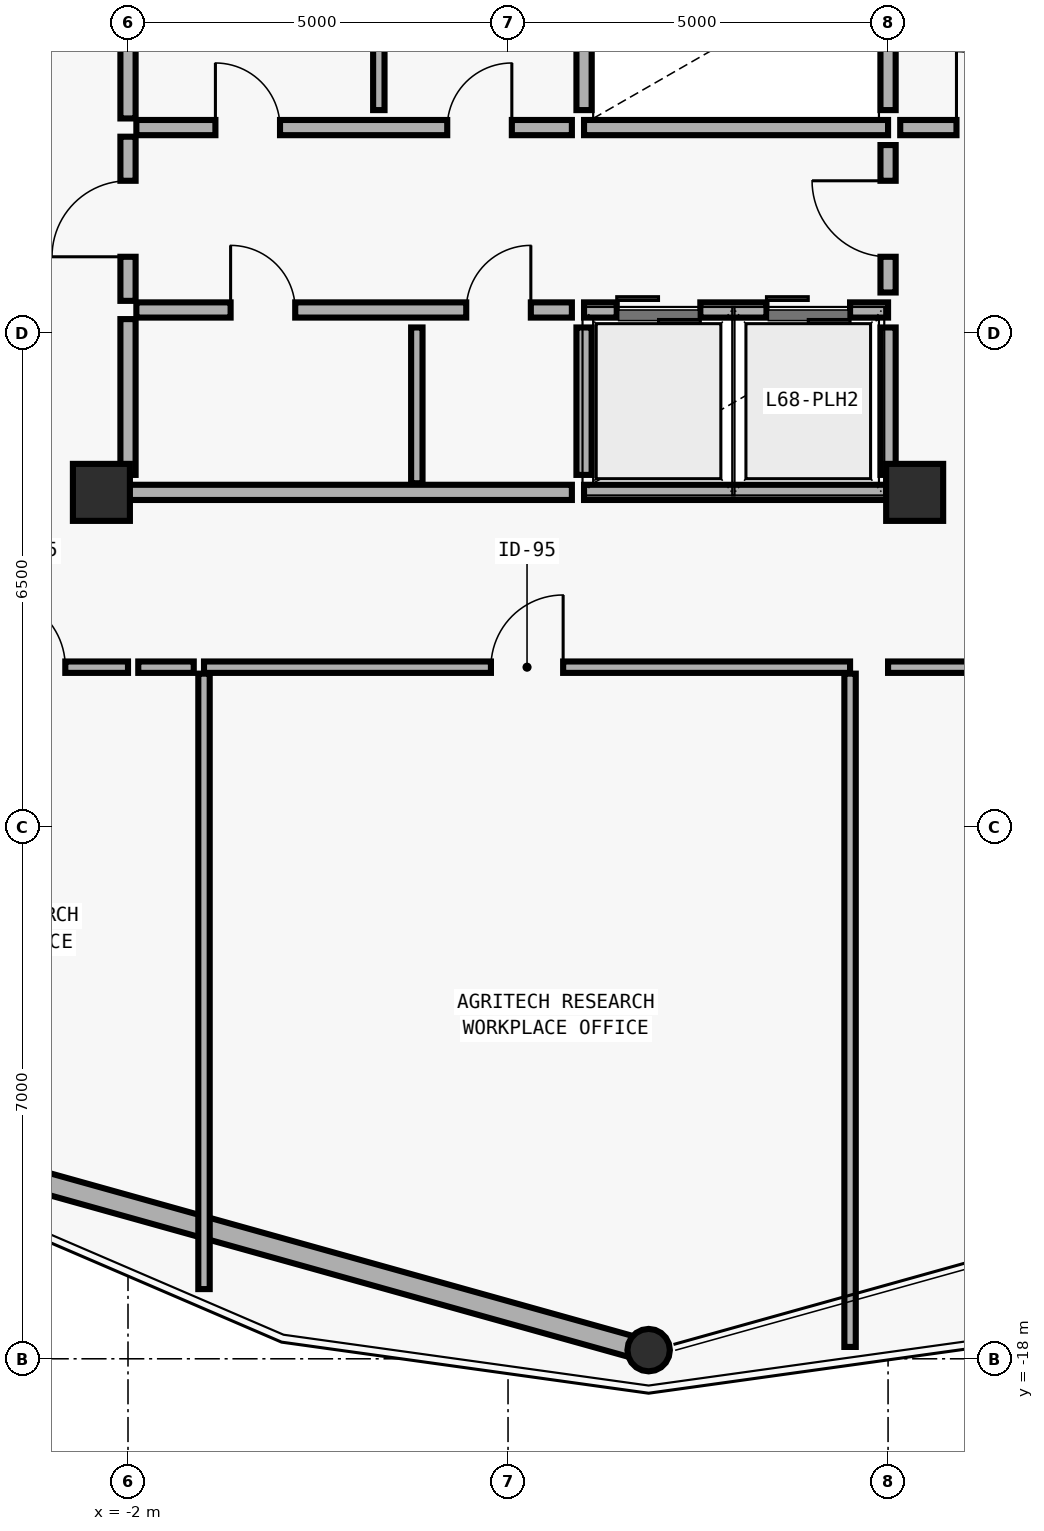
"""IFC4 building model, lengths in metres.
Left out: names, types, materials, properties, quantities, classifications, styles, units other than length and angle.
Written with IfcOpenShell. Run it as: python <this file> out.ifc"""

import sys

from ifc_helpers import new_model, si_unit, direction, frame, frame_2d, origin, origin_2d, place, context, subcontext, project, spatial, rectangle, hollow_circle, extrude, element, fill, save


model = new_model("IFC4")
c1 = context("Model", 3, precision=1e-05, world=origin(), true_north=direction((0.0, 1.0)))
c2 = subcontext(c1, "Body", "Model", "MODEL_VIEW")
j1 = project(units=[si_unit("LENGTHUNIT", "METRE"), si_unit("PLANEANGLEUNIT", "RADIAN")], contexts=[c1])
p1 = place(None, origin())
s1 = spatial("IfcSite", under=j1, at=p1, CompositionType="ELEMENT")
p2 = place(p1, origin())
s2 = spatial("IfcBuilding", under=s1, at=p2, CompositionType="ELEMENT")
p3 = place(p2, frame((0.0, 0.0, 267.0)))
s3 = spatial("IfcBuildingStorey", under=s2, at=p3, CompositionType="ELEMENT", Elevation=267.0)
for number, where, z_axis, x_axis in (
    (1, (-2.35, -6.6, 0.0), (0.0, 0.0, 1.0), (1.0, 0.0, 0.0)),
    (2, (8.35, -6.6, 0.0), (0.0, 0.0, 1.0), (1.0, 0.0, 0.0)),
):
    element("IfcColumn", number, at=place(p3, frame(where, z_axis=z_axis, x_axis=x_axis)), inside=s3, PredefinedType="COLUMN", context=c2, shape_type="SweptSolid", body=[
        extrude(rectangle(XDim=0.75, YDim=0.75, at=origin_2d()), origin(), (0.0, 0.0, 1.0), 3.575),
    ])
p4 = place(p3, frame((4.85, -17.903, 0.0), z_axis=(0.0, 0.00956044538, 0.999954297898), x_axis=(-1.0, 0.0, 0.0)))
e3 = element("IfcColumn", 3, at=p4, inside=s3, PredefinedType="COLUMN", context=c2, shape_type="SweptSolid", body=[
    extrude(hollow_circle(Radius=0.28, WallThickness=0.02, at=origin_2d()), origin(), (0.0, 0.0, 1.0), 3.575),
])
p5 = place(p3, frame((4.624, -17.84, 0.0), z_axis=(0.0, 0.0, 1.0), x_axis=(-0.963175454127, 0.268873659119, 0.0)))
e4 = element("IfcWall", 4, at=p5, inside=s3, PredefinedType="SOLIDWALL", context=c2, shape_type="SweptSolid", body=[
    extrude(rectangle(XDim=8.886, YDim=0.28, at=frame_2d((4.443, 0.0))), origin(), (0.0, 0.0, 1.0), 2.97),
])
p6 = place(p3, frame((4.0, -1.8, 0.0), z_axis=(0.0, 0.0, 1.0), x_axis=(1.0, 0.0, 0.0)))
e5 = element("IfcWall", 5, at=p6, inside=s3, PredefinedType="SOLIDWALL", context=c2, shape_type="SweptSolid", body=[
    extrude(rectangle(XDim=4.0, YDim=0.2, at=frame_2d((2.0, 0.0))), origin(), (0.0, 0.0, 1.0), 3.36),
])
p7 = place(p3, frame((4.0, -1.57, 0.0), z_axis=(0.0, 0.0, 1.0), x_axis=(0.0, 1.0, 0.0)))
e6 = element("IfcWall", 6, at=p7, inside=s3, PredefinedType="SOLIDWALL", context=c2, shape_type="SweptSolid", body=[
    extrude(rectangle(XDim=1.94, YDim=0.2, at=frame_2d((0.97, 0.0))), origin(), (0.0, 0.0, 1.0), 3.36),
])
p8 = place(p3, frame((8.0, -1.57, 0.0), z_axis=(0.0, 0.0, 1.0), x_axis=(0.0, 1.0, 0.0)))
e7 = element("IfcWall", 7, at=p8, inside=s3, PredefinedType="SOLIDWALL", context=c2, shape_type="SweptSolid", body=[
    extrude(rectangle(XDim=2.05, YDim=0.2, at=frame_2d((1.025, 0.0))), origin(), (0.0, 0.0, 1.0), 3.072),
])
p9 = place(p3, frame((4.0, -4.2, 0.0), z_axis=(0.0, 0.0, 1.0), x_axis=(1.0, 0.0, 0.0)))
e8 = element("IfcWall", 8, at=p9, inside=s3, PredefinedType="SOLIDWALL", context=c2, shape_type="SweptSolid", body=[
    extrude(rectangle(XDim=4.0, YDim=0.2, at=frame_2d((2.0, 0.0))), origin(), (0.0, 0.0, 1.0), 3.36),
])
p10 = place(p9, frame((0.43, 0.0, 0.0)))
e9 = element("IfcOpeningElement", 9, at=p10, cuts=e8, PredefinedType="OPENING", context=c2, shape_type="SweptSolid", body=[
    extrude(rectangle(XDim=1.1, YDim=2.2, at=frame_2d((0.55, 1.1))), frame((0.0, 0.11, 0.0), z_axis=(0.0, -1.0, 0.0), x_axis=(1.0, 0.0, 0.0)), (0.0, 0.0, 1.0), 0.22),
])
p11 = place(p9, frame((2.4, 0.0, 0.0)))
e10 = element("IfcOpeningElement", 10, at=p11, cuts=e8, PredefinedType="OPENING", context=c2, shape_type="SweptSolid", body=[
    extrude(rectangle(XDim=1.1, YDim=2.2, at=frame_2d((0.55, 1.1))), frame((0.0, 0.11, 0.0), z_axis=(0.0, -1.0, 0.0), x_axis=(1.0, 0.0, 0.0)), (0.0, 0.0, 1.0), 0.22),
])
p12 = place(p3, frame((4.0, -6.6, 0.0), z_axis=(0.0, 0.0, 1.0), x_axis=(1.0, 0.0, 0.0)))
e11 = element("IfcWall", 11, at=p12, inside=s3, PredefinedType="SOLIDWALL", context=c2, shape_type="SweptSolid", body=[
    extrude(rectangle(XDim=4.0, YDim=0.2, at=frame_2d((2.0, 0.0))), origin(), (0.0, 0.0, 1.0), 3.072),
])
p13 = place(p3, frame((4.0, -6.37, 0.0), z_axis=(0.0, 0.0, 1.0), x_axis=(0.0, 1.0, 0.0)))
e12 = element("IfcWall", 12, at=p13, inside=s3, PredefinedType="SOLIDWALL", context=c2, shape_type="SweptSolid", body=[
    extrude(rectangle(XDim=1.94, YDim=0.2, at=frame_2d((0.97, 0.0))), origin(), (0.0, 0.0, 1.0), 3.36),
])
p14 = place(p3, frame((8.0, -6.37, 0.0), z_axis=(0.0, 0.0, 1.0), x_axis=(0.0, 1.0, 0.0)))
e13 = element("IfcWall", 13, at=p14, inside=s3, PredefinedType="SOLIDWALL", context=c2, shape_type="SweptSolid", body=[
    extrude(rectangle(XDim=1.94, YDim=0.2, at=frame_2d((0.97, 0.0))), origin(), (0.0, 0.0, 1.0), 3.072),
])
p15 = place(p3, frame((-2.0, -4.08, 0.0), z_axis=(0.0, 0.0, 1.0), x_axis=(0.0, 1.0, 0.0)))
e14 = element("IfcWall", 14, at=p15, inside=s3, PredefinedType="MOVABLE", context=c2, shape_type="SweptSolid", body=[
    extrude(rectangle(XDim=2.16, YDim=0.2, at=frame_2d((1.08, 0.0))), origin(), (0.0, 0.0, 1.0), 3.072),
])
p16 = place(p15, frame((0.58, 0.0, 0.0)))
e15 = element("IfcOpeningElement", 15, at=p16, cuts=e14, PredefinedType="OPENING", context=c2, shape_type="SweptSolid", body=[
    extrude(rectangle(XDim=1.0, YDim=2.1, at=frame_2d((0.5, 1.05))), frame((0.0, 0.11, 0.0), z_axis=(0.0, -1.0, 0.0), x_axis=(1.0, 0.0, 0.0)), (0.0, 0.0, 1.0), 0.22),
])
p17 = place(p3, frame((8.0, -3.97, 0.0), z_axis=(0.0, 0.0, 1.0), x_axis=(0.0, 1.0, 0.0)))
e16 = element("IfcWall", 16, at=p17, inside=s3, PredefinedType="MOVABLE", context=c2, shape_type="SweptSolid", body=[
    extrude(rectangle(XDim=1.94, YDim=0.2, at=frame_2d((0.97, 0.0))), origin(), (0.0, 0.0, 1.0), 3.072),
])
p18 = place(p17, frame((0.47, 0.0, 0.0)))
e17 = element("IfcOpeningElement", 17, at=p18, cuts=e16, PredefinedType="OPENING", context=c2, shape_type="SweptSolid", body=[
    extrude(rectangle(XDim=1.0, YDim=2.1, at=frame_2d((0.5, 1.05))), frame((0.0, 0.11, 0.0), z_axis=(0.0, -1.0, 0.0), x_axis=(1.0, 0.0, 0.0)), (0.0, 0.0, 1.0), 0.22),
])
p19 = place(p3, frame((-1.89, -1.8, 0.0), z_axis=(0.0, 0.0, 1.0), x_axis=(1.0, 0.0, 0.0)))
e18 = element("IfcWall", 18, at=p19, inside=s3, PredefinedType="MOVABLE", context=c2, shape_type="SweptSolid", body=[
    extrude(rectangle(XDim=5.73, YDim=0.2, at=frame_2d((2.865, 0.0))), origin(), (0.0, 0.0, 1.0), 3.36),
])
p20 = place(p19, frame((1.04, 0.0, 0.0)))
e19 = element("IfcOpeningElement", 19, at=p20, cuts=e18, PredefinedType="OPENING", context=c2, shape_type="SweptSolid", body=[
    extrude(rectangle(XDim=0.85, YDim=2.1, at=frame_2d((0.425, 1.05))), frame((0.0, 0.11, 0.0), z_axis=(0.0, -1.0, 0.0), x_axis=(1.0, 0.0, 0.0)), (0.0, 0.0, 1.0), 0.22),
])
p21 = place(p19, frame((4.09, 0.0, 0.0)))
e20 = element("IfcOpeningElement", 20, at=p21, cuts=e18, PredefinedType="OPENING", context=c2, shape_type="SweptSolid", body=[
    extrude(rectangle(XDim=0.85, YDim=2.1, at=frame_2d((0.425, 1.05))), frame((0.0, 0.11, 0.0), z_axis=(0.0, -1.0, 0.0), x_axis=(1.0, 0.0, 0.0)), (0.0, 0.0, 1.0), 0.22),
])
p22 = place(p3, frame((-1.89, -4.2, 0.0), z_axis=(0.0, 0.0, 1.0), x_axis=(1.0, 0.0, 0.0)))
e21 = element("IfcWall", 21, at=p22, inside=s3, PredefinedType="MOVABLE", context=c2, shape_type="SweptSolid", body=[
    extrude(rectangle(XDim=5.73, YDim=0.2, at=frame_2d((2.865, 0.0))), origin(), (0.0, 0.0, 1.0), 3.36),
])
p23 = place(p22, frame((1.24, 0.0, 0.0)))
e22 = element("IfcOpeningElement", 22, at=p23, cuts=e21, PredefinedType="OPENING", context=c2, shape_type="SweptSolid", body=[
    extrude(rectangle(XDim=0.85, YDim=2.1, at=frame_2d((0.425, 1.05))), frame((0.0, 0.11, 0.0), z_axis=(0.0, -1.0, 0.0), x_axis=(1.0, 0.0, 0.0)), (0.0, 0.0, 1.0), 0.22),
])
p24 = place(p22, frame((4.34, 0.0, 0.0)))
e23 = element("IfcOpeningElement", 23, at=p24, cuts=e21, PredefinedType="OPENING", context=c2, shape_type="SweptSolid", body=[
    extrude(rectangle(XDim=0.85, YDim=2.1, at=frame_2d((0.425, 1.05))), frame((0.0, 0.11, 0.0), z_axis=(0.0, -1.0, 0.0), x_axis=(1.0, 0.0, 0.0)), (0.0, 0.0, 1.0), 0.22),
])
p25 = place(p3, frame((8.16, -1.8, 0.0), z_axis=(0.0, 0.0, 1.0), x_axis=(1.0, 0.0, 0.0)))
e24 = element("IfcWall", 24, at=p25, inside=s3, PredefinedType="MOVABLE", context=c2, shape_type="SweptSolid", body=[
    extrude(rectangle(XDim=2.64, YDim=0.2, at=frame_2d((1.32, 0.0))), origin(), (0.0, 0.0, 1.0), 3.36),
])
p26 = place(p25, frame((0.74, 0.0, 0.0)))
e25 = element("IfcOpeningElement", 25, at=p26, cuts=e24, PredefinedType="OPENING", context=c2, shape_type="SweptSolid", body=[
    extrude(rectangle(XDim=1.0, YDim=2.1, at=frame_2d((0.5, 1.05))), frame((0.0, 0.11, 0.0), z_axis=(0.0, -1.0, 0.0), x_axis=(1.0, 0.0, 0.0)), (0.0, 0.0, 1.0), 0.22),
])
p27 = place(p3, frame((-4.6, -8.9, 0.0), z_axis=(0.0, 0.0, 1.0), x_axis=(1.0, 0.0, 0.0)))
e26 = element("IfcWall", 26, at=p27, inside=s3, PredefinedType="PARTITIONING", context=c2, shape_type="SweptSolid", body=[
    extrude(rectangle(XDim=2.6, YDim=0.15, at=frame_2d((1.3, 0.0))), origin(), (0.0, 0.0, 1.0), 3.36),
])
p28 = place(p27, frame((0.825, 0.0, 0.0)))
e27 = element("IfcOpeningElement", 27, at=p28, cuts=e26, PredefinedType="OPENING", context=c2, shape_type="SweptSolid", body=[
    extrude(rectangle(XDim=0.95, YDim=2.1, at=frame_2d((0.475, 1.05))), frame((0.0, 0.085, 0.0), z_axis=(0.0, -1.0, 0.0), x_axis=(1.0, 0.0, 0.0)), (0.0, 0.0, 1.0), 0.17),
])
p29 = place(p3, frame((-1.0, -8.9, 0.0), z_axis=(0.0, 0.0, 1.0), x_axis=(1.0, 0.0, 0.0)))
e28 = element("IfcWall", 28, at=p29, inside=s3, PredefinedType="PARTITIONING", context=c2, shape_type="SweptSolid", body=[
    extrude(rectangle(XDim=8.5, YDim=0.15, at=frame_2d((4.25, 0.0))), origin(), (0.0, 0.0, 1.0), 3.36),
])
p30 = place(p29, frame((3.775, 0.0, 0.0)))
e29 = element("IfcOpeningElement", 29, at=p30, cuts=e28, PredefinedType="OPENING", context=c2, shape_type="SweptSolid", body=[
    extrude(rectangle(XDim=0.95, YDim=2.1, at=frame_2d((0.475, 1.05))), frame((0.0, 0.085, 0.0), z_axis=(0.0, -1.0, 0.0), x_axis=(1.0, 0.0, 0.0)), (0.0, 0.0, 1.0), 0.17),
])
p31 = place(p3, frame((1.3, -1.57, 0.0), z_axis=(0.0, 0.0, 1.0), x_axis=(0.0, 1.0, 0.0)))
e30 = element("IfcWall", 30, at=p31, inside=s3, PredefinedType="PARTITIONING", context=c2, shape_type="SweptSolid", body=[
    extrude(rectangle(XDim=1.94, YDim=0.15, at=frame_2d((0.97, 0.0))), origin(), (0.0, 0.0, 1.0), 3.36),
])
p32 = place(p3, frame((-2.0, -1.68, 0.0), z_axis=(0.0, 0.0, 1.0), x_axis=(0.0, 1.0, 0.0)))
e31 = element("IfcWall", 31, at=p32, inside=s3, PredefinedType="MOVABLE", context=c2, shape_type="SweptSolid", body=[
    extrude(rectangle(XDim=2.16, YDim=0.2, at=frame_2d((1.08, 0.0))), origin(), (0.0, 0.0, 1.0), 3.072),
])
p33 = place(p3, frame((1.8, -6.48, 0.0), z_axis=(0.0, 0.0, 1.0), x_axis=(0.0, 1.0, 0.0)))
e32 = element("IfcWall", 32, at=p33, inside=s3, PredefinedType="PARTITIONING", context=c2, shape_type="SweptSolid", body=[
    extrude(rectangle(XDim=2.05, YDim=0.15, at=frame_2d((1.025, 0.0))), origin(), (0.0, 0.0, 1.0), 3.36),
])
p34 = place(p3, frame((-2.0, -6.6, 0.0), z_axis=(0.0, 0.0, 1.0), x_axis=(1.0, 0.0, 0.0)))
e33 = element("IfcWall", 33, at=p34, inside=s3, PredefinedType="MOVABLE", context=c2, shape_type="SweptSolid", body=[
    extrude(rectangle(XDim=5.84, YDim=0.2, at=frame_2d((2.92, 0.0))), origin(), (0.0, 0.0, 1.0), 3.072),
])
p35 = place(p3, frame((-2.0, -6.37, 0.0), z_axis=(0.0, 0.0, 1.0), x_axis=(0.0, 1.0, 0.0)))
e34 = element("IfcWall", 34, at=p35, inside=s3, PredefinedType="MOVABLE", context=c2, shape_type="SweptSolid", body=[
    extrude(rectangle(XDim=2.05, YDim=0.2, at=frame_2d((1.025, 0.0))), origin(), (0.0, 0.0, 1.0), 3.072),
])
p36 = place(p3, frame((-1.865, -8.9, 0.0), z_axis=(0.0, 0.0, 1.0), x_axis=(1.0, 0.0, 0.0)))
e35 = element("IfcWall", 35, at=p36, inside=s3, PredefinedType="PARTITIONING", context=c2, shape_type="SweptSolid", body=[
    extrude(rectangle(XDim=0.73, YDim=0.15, at=frame_2d((0.365, 0.0))), origin(), (0.0, 0.0, 1.0), 3.36),
])
p37 = place(p3, frame((-1.0, -8.985, 0.0), z_axis=(0.0, 0.0, 1.0), x_axis=(0.0, -1.0, 0.0)))
e36 = element("IfcWall", 36, at=p37, inside=s3, PredefinedType="PARTITIONING", context=c2, shape_type="SweptSolid", body=[
    extrude(rectangle(XDim=8.098, YDim=0.15, at=frame_2d((4.049, 0.0))), origin(), (0.0, 0.0, 1.0), 3.36),
])
p38 = place(p3, frame((7.5, -8.985, 0.0), z_axis=(0.0, 0.0, 1.0), x_axis=(0.0, -1.0, 0.0)))
e37 = element("IfcWall", 37, at=p38, inside=s3, PredefinedType="PARTITIONING", context=c2, shape_type="SweptSolid", body=[
    extrude(rectangle(XDim=8.859, YDim=0.15, at=frame_2d((4.429, 0.0))), origin(), (0.0, 0.0, 1.0), 2.892),
])
p39 = place(p3, frame((8.0, -8.9, 0.0), z_axis=(0.0, 0.0, 1.0), x_axis=(1.0, 0.0, 0.0)))
e38 = element("IfcWall", 38, at=p39, inside=s3, PredefinedType="PARTITIONING", context=c2, shape_type="SweptSolid", body=[
    extrude(rectangle(XDim=2.8, YDim=0.15, at=frame_2d((1.4, 0.0))), origin(), (0.0, 0.0, 1.0), 3.36),
])
p40 = place(p16, origin())
e39 = element("IfcDoor", 39, at=p40, inside=s3, OperationType="SINGLE_SWING_LEFT", PredefinedType="DOOR", context=c2, shape_type="SweptSolid", body=[
    extrude(rectangle(XDim=1.0, YDim=2.1, at=frame_2d((0.5, 1.05))), frame((0.0, 0.025, 0.0), z_axis=(0.0, -1.0, 0.0), x_axis=(1.0, 0.0, 0.0)), (0.0, 0.0, 1.0), 0.05),
])
fill(e15, e39)
p41 = place(p18, origin())
e40 = element("IfcDoor", 40, at=p41, inside=s3, OperationType="SINGLE_SWING_RIGHT", PredefinedType="DOOR", context=c2, shape_type="SweptSolid", body=[
    extrude(rectangle(XDim=1.0, YDim=2.1, at=frame_2d((0.5, 1.05))), frame((0.0, 0.025, 0.0), z_axis=(0.0, -1.0, 0.0), x_axis=(1.0, 0.0, 0.0)), (0.0, 0.0, 1.0), 0.05),
])
fill(e17, e40)
p42 = place(p20, origin())
e41 = element("IfcDoor", 41, at=p42, inside=s3, OperationType="SINGLE_SWING_LEFT", PredefinedType="DOOR", context=c2, shape_type="SweptSolid", body=[
    extrude(rectangle(XDim=0.85, YDim=2.1, at=frame_2d((0.425, 1.05))), frame((0.0, 0.025, 0.0), z_axis=(0.0, -1.0, 0.0), x_axis=(1.0, 0.0, 0.0)), (0.0, 0.0, 1.0), 0.05),
])
fill(e19, e41)
p43 = place(p21, origin())
e42 = element("IfcDoor", 42, at=p43, inside=s3, OperationType="SINGLE_SWING_RIGHT", PredefinedType="DOOR", context=c2, shape_type="SweptSolid", body=[
    extrude(rectangle(XDim=0.85, YDim=2.1, at=frame_2d((0.425, 1.05))), frame((0.0, 0.025, 0.0), z_axis=(0.0, -1.0, 0.0), x_axis=(1.0, 0.0, 0.0)), (0.0, 0.0, 1.0), 0.05),
])
fill(e20, e42)
p44 = place(p23, origin())
e43 = element("IfcDoor", 43, at=p44, inside=s3, OperationType="SINGLE_SWING_LEFT", PredefinedType="DOOR", context=c2, shape_type="SweptSolid", body=[
    extrude(rectangle(XDim=0.85, YDim=2.1, at=frame_2d((0.425, 1.05))), frame((0.0, 0.025, 0.0), z_axis=(0.0, -1.0, 0.0), x_axis=(1.0, 0.0, 0.0)), (0.0, 0.0, 1.0), 0.05),
])
fill(e22, e43)
p45 = place(p24, origin())
e44 = element("IfcDoor", 44, at=p45, inside=s3, OperationType="SINGLE_SWING_RIGHT", PredefinedType="DOOR", context=c2, shape_type="SweptSolid", body=[
    extrude(rectangle(XDim=0.85, YDim=2.1, at=frame_2d((0.425, 1.05))), frame((0.0, 0.025, 0.0), z_axis=(0.0, -1.0, 0.0), x_axis=(1.0, 0.0, 0.0)), (0.0, 0.0, 1.0), 0.05),
])
fill(e23, e44)
p46 = place(p26, origin())
e45 = element("IfcDoor", 45, at=p46, inside=s3, OperationType="SINGLE_SWING_LEFT", PredefinedType="DOOR", context=c2, shape_type="SweptSolid", body=[
    extrude(rectangle(XDim=1.0, YDim=2.1, at=frame_2d((0.5, 1.05))), frame((0.0, 0.025, 0.0), z_axis=(0.0, -1.0, 0.0), x_axis=(1.0, 0.0, 0.0)), (0.0, 0.0, 1.0), 0.05),
])
fill(e25, e45)
p47 = place(p28, origin())
e46 = element("IfcDoor", 46, at=p47, inside=s3, OperationType="SINGLE_SWING_LEFT", PredefinedType="DOOR", context=c2, shape_type="SweptSolid", body=[
    extrude(rectangle(XDim=0.95, YDim=2.1, at=frame_2d((0.475, 1.05))), frame((0.0, 0.025, 0.0), z_axis=(0.0, -1.0, 0.0), x_axis=(1.0, 0.0, 0.0)), (0.0, 0.0, 1.0), 0.05),
])
fill(e27, e46)
p48 = place(p30, origin())
e47 = element("IfcDoor", 47, at=p48, inside=s3, OperationType="SINGLE_SWING_RIGHT", PredefinedType="DOOR", context=c2, shape_type="SweptSolid", body=[
    extrude(rectangle(XDim=0.95, YDim=2.1, at=frame_2d((0.475, 1.05))), frame((0.0, 0.025, 0.0), z_axis=(0.0, -1.0, 0.0), x_axis=(1.0, 0.0, 0.0)), (0.0, 0.0, 1.0), 0.05),
])
fill(e29, e47)
p49 = place(p10, origin())
e48 = element("IfcDoor", 48, at=p49, inside=s3, OperationType="DOUBLE_DOOR_SLIDING", PredefinedType="DOOR", context=c2, shape_type="SweptSolid", body=[
    extrude(rectangle(XDim=1.1, YDim=2.2, at=frame_2d((0.55, 1.1))), frame((0.0, 0.025, 0.0), z_axis=(0.0, -1.0, 0.0), x_axis=(1.0, 0.0, 0.0)), (0.0, 0.0, 1.0), 0.05),
])
fill(e9, e48)
p50 = place(p11, origin())
e49 = element("IfcDoor", 49, at=p50, inside=s3, OperationType="DOUBLE_DOOR_SLIDING", PredefinedType="DOOR", context=c2, shape_type="SweptSolid", body=[
    extrude(rectangle(XDim=1.1, YDim=2.2, at=frame_2d((0.55, 1.1))), frame((0.0, 0.025, 0.0), z_axis=(0.0, -1.0, 0.0), x_axis=(1.0, 0.0, 0.0)), (0.0, 0.0, 1.0), 0.05),
])
fill(e10, e49)
save(model, sys.argv[1])
